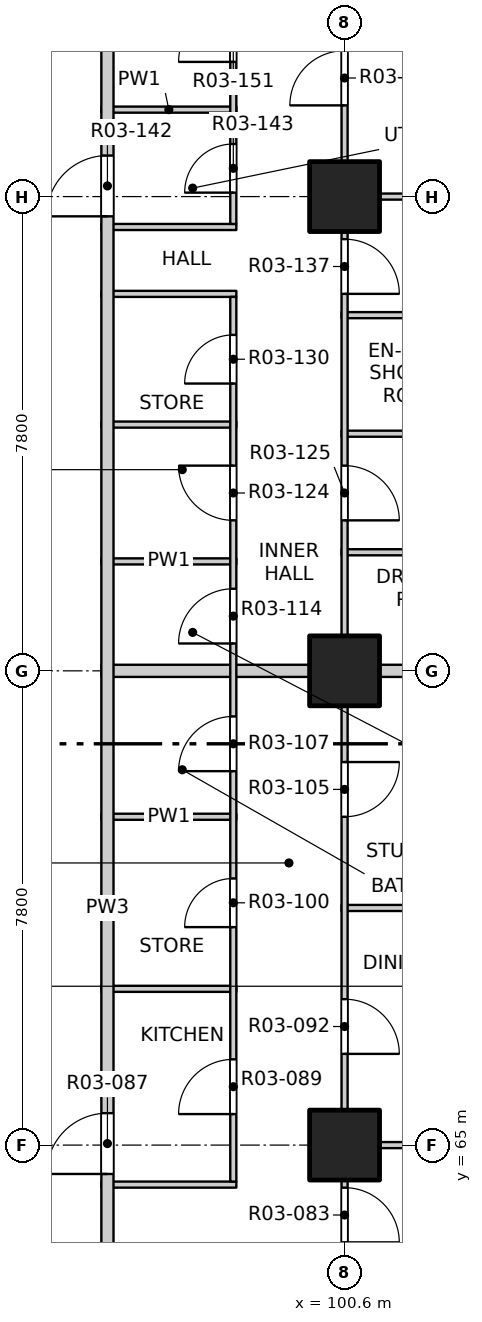
"""IFC4 building model, lengths in metres.
Left out: names, types, materials, properties, quantities, classifications, styles, units other than length and angle.
Written with IfcOpenShell. Run it as: python <this file> out.ifc"""

import sys

from ifc_helpers import new_model, si_unit, direction, frame, frame_2d, origin, origin_2d, place, context, subcontext, project, spatial, rectangle, extrude, element, fill, save


model = new_model("IFC4")
c1 = context("Model", 3, precision=1e-05, world=origin(), true_north=direction((0.0, 1.0)))
c2 = subcontext(c1, "Body", "Model", "MODEL_VIEW")
j1 = project(units=[si_unit("LENGTHUNIT", "METRE"), si_unit("PLANEANGLEUNIT", "RADIAN")], contexts=[c1])
p1 = place(None, origin())
s1 = spatial("IfcSite", under=j1, at=p1, CompositionType="ELEMENT")
p2 = place(p1, origin())
s2 = spatial("IfcBuilding", under=s1, at=p2, CompositionType="ELEMENT")
p3 = place(p2, frame((0.0, 0.0, 43.3)))
s3 = spatial("IfcBuildingStorey", under=s2, at=p3, CompositionType="ELEMENT", Elevation=43.3)
for number, where, z_axis, x_axis in (
    (1, (100.6, 65.0, -0.25), (0.0, 0.0, 1.0), (1.0, 0.0, 0.0)),
    (2, (100.6, 72.8, -0.25), (0.0, 0.0, 1.0), (1.0, 0.0, 0.0)),
    (3, (100.6, 80.6, -0.25), (0.0, 0.0, 1.0), (1.0, 0.0, 0.0)),
):
    element("IfcColumn", number, at=place(p3, frame(where, z_axis=z_axis, x_axis=x_axis)), inside=s3, PredefinedType="COLUMN", context=c2, shape_type="SweptSolid", body=[
        extrude(rectangle(XDim=1.15, YDim=1.15, at=origin_2d()), origin(), (0.0, 0.0, 1.0), 3.35),
    ])
p4 = place(p3, frame((96.6, 64.35, 0.0), z_axis=(0.0, 0.0, 1.0), x_axis=(1.0, 0.0, 0.0)))
e4 = element("IfcWall", 4, at=p4, inside=s3, PredefinedType="PARTITIONING", context=c2, shape_type="SweptSolid", body=[
    extrude(rectangle(XDim=2.22, YDim=0.1, at=frame_2d((1.11, 0.0))), origin(), (0.0, 0.0, 1.0), 3.1),
])
p5 = place(p3, frame((100.55, 65.0, 0.0), z_axis=(0.0, 0.0, 1.0), x_axis=(1.0, 0.0, 0.0)))
e5 = element("IfcWall", 5, at=p5, inside=s3, PredefinedType="PARTITIONING", context=c2, shape_type="SweptSolid", body=[
    extrude(rectangle(XDim=7.55, YDim=0.1, at=frame_2d((3.775, 0.0))), origin(), (0.0, 0.0, 1.0), 3.1),
])
p6 = place(p3, frame((96.6, 67.57, 0.0), z_axis=(0.0, 0.0, 1.0), x_axis=(1.0, 0.0, 0.0)))
e6 = element("IfcWall", 6, at=p6, inside=s3, PredefinedType="PARTITIONING", context=c2, shape_type="SweptSolid", body=[
    extrude(rectangle(XDim=2.22, YDim=0.1, at=frame_2d((1.11, 0.0))), origin(), (0.0, 0.0, 1.0), 3.1),
])
p7 = place(p3, frame((100.55, 68.9, 0.0), z_axis=(0.0, 0.0, 1.0), x_axis=(1.0, 0.0, 0.0)))
e7 = element("IfcWall", 7, at=p7, inside=s3, PredefinedType="PARTITIONING", context=c2, shape_type="SweptSolid", body=[
    extrude(rectangle(XDim=7.55, YDim=0.1, at=frame_2d((3.775, 0.0))), origin(), (0.0, 0.0, 1.0), 3.1),
])
p8 = place(p3, frame((96.6, 70.4, 0.0), z_axis=(0.0, 0.0, 1.0), x_axis=(1.0, 0.0, 0.0)))
e8 = element("IfcWall", 8, at=p8, inside=s3, PredefinedType="PARTITIONING", context=c2, shape_type="SweptSolid", body=[
    extrude(rectangle(XDim=2.22, YDim=0.1, at=frame_2d((1.11, 0.0))), origin(), (0.0, 0.0, 1.0), 3.1),
])
p9 = place(p3, frame((96.6, 72.8, 0.0), z_axis=(0.0, 0.0, 1.0), x_axis=(1.0, 0.0, 0.0)))
e9 = element("IfcWall", 9, at=p9, inside=s3, PredefinedType="PARTITIONING", context=c2, shape_type="SweptSolid", body=[
    extrude(rectangle(XDim=11.5, YDim=0.2, at=frame_2d((5.75, 0.0))), origin(), (0.0, 0.0, 1.0), 3.1),
])
p10 = place(p3, frame((96.6, 74.6, 0.0), z_axis=(0.0, 0.0, 1.0), x_axis=(1.0, 0.0, 0.0)))
e10 = element("IfcWall", 10, at=p10, inside=s3, PredefinedType="PARTITIONING", context=c2, shape_type="SweptSolid", body=[
    extrude(rectangle(XDim=2.22, YDim=0.1, at=frame_2d((1.11, 0.0))), origin(), (0.0, 0.0, 1.0), 3.1),
])
p11 = place(p3, frame((100.55, 74.75, 0.0), z_axis=(0.0, 0.0, 1.0), x_axis=(1.0, 0.0, 0.0)))
e11 = element("IfcWall", 11, at=p11, inside=s3, PredefinedType="PARTITIONING", context=c2, shape_type="SweptSolid", body=[
    extrude(rectangle(XDim=3.55, YDim=0.1, at=frame_2d((1.775, 0.0))), origin(), (0.0, 0.0, 1.0), 3.1),
])
p12 = place(p3, frame((100.55, 76.7, 0.0), z_axis=(0.0, 0.0, 1.0), x_axis=(1.0, 0.0, 0.0)))
e12 = element("IfcWall", 12, at=p12, inside=s3, PredefinedType="PARTITIONING", context=c2, shape_type="SweptSolid", body=[
    extrude(rectangle(XDim=7.55, YDim=0.1, at=frame_2d((3.775, 0.0))), origin(), (0.0, 0.0, 1.0), 3.1),
])
p13 = place(p3, frame((96.6, 76.85, 0.0), z_axis=(0.0, 0.0, 1.0), x_axis=(1.0, 0.0, 0.0)))
e13 = element("IfcWall", 13, at=p13, inside=s3, PredefinedType="PARTITIONING", context=c2, shape_type="SweptSolid", body=[
    extrude(rectangle(XDim=2.22, YDim=0.1, at=frame_2d((1.11, 0.0))), origin(), (0.0, 0.0, 1.0), 3.1),
])
p14 = place(p3, frame((100.55, 78.65, 0.0), z_axis=(0.0, 0.0, 1.0), x_axis=(1.0, 0.0, 0.0)))
e14 = element("IfcWall", 14, at=p14, inside=s3, PredefinedType="PARTITIONING", context=c2, shape_type="SweptSolid", body=[
    extrude(rectangle(XDim=3.55, YDim=0.1, at=frame_2d((1.775, 0.0))), origin(), (0.0, 0.0, 1.0), 3.1),
])
for number, where, z_axis, x_axis in (
    (15, (96.6, 79.0, 0.0), (0.0, 0.0, 1.0), (1.0, 0.0, 0.0)),
    (16, (96.6, 80.1, 0.0), (0.0, 0.0, 1.0), (1.0, 0.0, 0.0)),
):
    element("IfcWall", number, at=place(p3, frame(where, z_axis=z_axis, x_axis=x_axis)), inside=s3, PredefinedType="PARTITIONING", context=c2, shape_type="SweptSolid", body=[
        extrude(rectangle(XDim=2.22, YDim=0.1, at=frame_2d((1.11, 0.0))), origin(), (0.0, 0.0, 1.0), 3.1),
    ])
p15 = place(p3, frame((100.55, 80.6, 0.0), z_axis=(0.0, 0.0, 1.0), x_axis=(1.0, 0.0, 0.0)))
e17 = element("IfcWall", 17, at=p15, inside=s3, PredefinedType="PARTITIONING", context=c2, shape_type="SweptSolid", body=[
    extrude(rectangle(XDim=7.55, YDim=0.1, at=frame_2d((3.775, 0.0))), origin(), (0.0, 0.0, 1.0), 3.1),
])
p16 = place(p3, frame((96.6, 82.03, 0.0), z_axis=(0.0, 0.0, 1.0), x_axis=(1.0, 0.0, 0.0)))
e18 = element("IfcWall", 18, at=p16, inside=s3, PredefinedType="PARTITIONING", context=c2, shape_type="SweptSolid", body=[
    extrude(rectangle(XDim=2.22, YDim=0.1, at=frame_2d((1.11, 0.0))), origin(), (0.0, 0.0, 1.0), 3.1),
])
p17 = place(p3, frame((96.7, 53.4, 0.0), z_axis=(0.0, 0.0, 1.0), x_axis=(0.0, 1.0, 0.0)))
e19 = element("IfcWall", 19, at=p17, inside=s3, PredefinedType="PARTITIONING", context=c2, shape_type="SweptSolid", body=[
    extrude(rectangle(XDim=31.0, YDim=0.2, at=frame_2d((15.5, 0.0))), origin(), (0.0, 0.0, 1.0), 3.1),
])
p18 = place(p17, frame((3.325, 0.0, 0.0)))
e20 = element("IfcOpeningElement", 20, at=p18, cuts=e19, PredefinedType="OPENING", context=c2, shape_type="SweptSolid", body=[
    extrude(rectangle(XDim=1.0, YDim=2.1, at=frame_2d((0.5, 1.05))), frame((0.0, 0.11, 0.0), z_axis=(0.0, -1.0, 0.0), x_axis=(1.0, 0.0, 0.0)), (0.0, 0.0, 1.0), 0.22),
])
p19 = place(p17, frame((11.125, 0.0, 0.0)))
e21 = element("IfcOpeningElement", 21, at=p19, cuts=e19, PredefinedType="OPENING", context=c2, shape_type="SweptSolid", body=[
    extrude(rectangle(XDim=1.0, YDim=2.1, at=frame_2d((0.5, 1.05))), frame((0.0, 0.11, 0.0), z_axis=(0.0, -1.0, 0.0), x_axis=(1.0, 0.0, 0.0)), (0.0, 0.0, 1.0), 0.22),
])
p20 = place(p17, frame((26.875, 0.0, 0.0)))
e22 = element("IfcOpeningElement", 22, at=p20, cuts=e19, PredefinedType="OPENING", context=c2, shape_type="SweptSolid", body=[
    extrude(rectangle(XDim=1.0, YDim=2.1, at=frame_2d((0.5, 1.05))), frame((0.0, 0.11, 0.0), z_axis=(0.0, -1.0, 0.0), x_axis=(1.0, 0.0, 0.0)), (0.0, 0.0, 1.0), 0.22),
])
p21 = place(p3, frame((98.77, 64.4, 0.0), z_axis=(0.0, 0.0, 1.0), x_axis=(0.0, 1.0, 0.0)))
e23 = element("IfcWall", 23, at=p21, inside=s3, PredefinedType="PARTITIONING", context=c2, shape_type="SweptSolid", body=[
    extrude(rectangle(XDim=14.55, YDim=0.1, at=frame_2d((7.275, 0.0))), origin(), (0.0, 0.0, 1.0), 3.1),
])
p22 = place(p21, frame((1.11, 0.0, 0.0)))
e24 = element("IfcOpeningElement", 24, at=p22, cuts=e23, PredefinedType="OPENING", context=c2, shape_type="SweptSolid", body=[
    extrude(rectangle(XDim=0.9, YDim=2.1, at=frame_2d((0.45, 1.05))), frame((0.0, 0.06, 0.0), z_axis=(0.0, -1.0, 0.0), x_axis=(1.0, 0.0, 0.0)), (0.0, 0.0, 1.0), 0.12),
])
p23 = place(p21, frame((4.185, 0.0, 0.0)))
e25 = element("IfcOpeningElement", 25, at=p23, cuts=e23, PredefinedType="OPENING", context=c2, shape_type="SweptSolid", body=[
    extrude(rectangle(XDim=0.8, YDim=2.1, at=frame_2d((0.4, 1.05))), frame((0.0, 0.06, 0.0), z_axis=(0.0, -1.0, 0.0), x_axis=(1.0, 0.0, 0.0)), (0.0, 0.0, 1.0), 0.12),
])
p24 = place(p21, frame((6.75, 0.0, 0.0)))
e26 = element("IfcOpeningElement", 26, at=p24, cuts=e23, PredefinedType="OPENING", context=c2, shape_type="SweptSolid", body=[
    extrude(rectangle(XDim=0.9, YDim=2.1, at=frame_2d((0.45, 1.05))), frame((0.0, 0.06, 0.0), z_axis=(0.0, -1.0, 0.0), x_axis=(1.0, 0.0, 0.0)), (0.0, 0.0, 1.0), 0.12),
])
p25 = place(p21, frame((8.85, 0.0, 0.0)))
e27 = element("IfcOpeningElement", 27, at=p25, cuts=e23, PredefinedType="OPENING", context=c2, shape_type="SweptSolid", body=[
    extrude(rectangle(XDim=0.9, YDim=2.1, at=frame_2d((0.45, 1.05))), frame((0.0, 0.06, 0.0), z_axis=(0.0, -1.0, 0.0), x_axis=(1.0, 0.0, 0.0)), (0.0, 0.0, 1.0), 0.12),
])
p26 = place(p21, frame((10.875, 0.0, 0.0)))
e28 = element("IfcOpeningElement", 28, at=p26, cuts=e23, PredefinedType="OPENING", context=c2, shape_type="SweptSolid", body=[
    extrude(rectangle(XDim=0.9, YDim=2.1, at=frame_2d((0.45, 1.05))), frame((0.0, 0.06, 0.0), z_axis=(0.0, -1.0, 0.0), x_axis=(1.0, 0.0, 0.0)), (0.0, 0.0, 1.0), 0.12),
])
p27 = place(p21, frame((13.125, 0.0, 0.0)))
e29 = element("IfcOpeningElement", 29, at=p27, cuts=e23, PredefinedType="OPENING", context=c2, shape_type="SweptSolid", body=[
    extrude(rectangle(XDim=0.8, YDim=2.1, at=frame_2d((0.4, 1.05))), frame((0.0, 0.06, 0.0), z_axis=(0.0, -1.0, 0.0), x_axis=(1.0, 0.0, 0.0)), (0.0, 0.0, 1.0), 0.12),
])
p28 = place(p3, frame((98.77, 80.15, 0.0), z_axis=(0.0, 0.0, 1.0), x_axis=(0.0, 1.0, 0.0)))
e30 = element("IfcWall", 30, at=p28, inside=s3, PredefinedType="PARTITIONING", context=c2, shape_type="SweptSolid", body=[
    extrude(rectangle(XDim=4.3, YDim=0.1, at=frame_2d((2.15, 0.0))), origin(), (0.0, 0.0, 1.0), 3.1),
])
p29 = place(p28, frame((0.515, 0.0, 0.0)))
e31 = element("IfcOpeningElement", 31, at=p29, cuts=e30, PredefinedType="OPENING", context=c2, shape_type="SweptSolid", body=[
    extrude(rectangle(XDim=0.8, YDim=2.1, at=frame_2d((0.4, 1.05))), frame((0.0, 0.06, 0.0), z_axis=(0.0, -1.0, 0.0), x_axis=(1.0, 0.0, 0.0)), (0.0, 0.0, 1.0), 0.12),
])
p30 = place(p28, frame((2.665, 0.0, 0.0)))
e32 = element("IfcOpeningElement", 32, at=p30, cuts=e30, PredefinedType="OPENING", context=c2, shape_type="SweptSolid", body=[
    extrude(rectangle(XDim=0.9, YDim=2.1, at=frame_2d((0.45, 1.05))), frame((0.0, 0.06, 0.0), z_axis=(0.0, -1.0, 0.0), x_axis=(1.0, 0.0, 0.0)), (0.0, 0.0, 1.0), 0.12),
])
p31 = place(p3, frame((100.6, 41.9, 0.0), z_axis=(0.0, 0.0, 1.0), x_axis=(0.0, 1.0, 0.0)))
e33 = element("IfcWall", 33, at=p31, inside=s3, PredefinedType="PARTITIONING", context=c2, shape_type="SweptSolid", body=[
    extrude(rectangle(XDim=46.2, YDim=0.1, at=frame_2d((23.1, 0.0))), origin(), (0.0, 0.0, 1.0), 3.1),
])
p32 = place(p31, frame((1.2, 0.0, 0.0)))
e34 = element("IfcOpeningElement", 34, at=p32, cuts=e33, PredefinedType="OPENING", context=c2, shape_type="SweptSolid", body=[
    extrude(rectangle(XDim=0.9, YDim=2.1, at=frame_2d((0.45, 1.05))), frame((0.0, 0.06, 0.0), z_axis=(0.0, -1.0, 0.0), x_axis=(1.0, 0.0, 0.0)), (0.0, 0.0, 1.0), 0.12),
])
p33 = place(p31, frame((5.9, 0.0, 0.0)))
e35 = element("IfcOpeningElement", 35, at=p33, cuts=e33, PredefinedType="OPENING", context=c2, shape_type="SweptSolid", body=[
    extrude(rectangle(XDim=0.9, YDim=2.1, at=frame_2d((0.45, 1.05))), frame((0.0, 0.06, 0.0), z_axis=(0.0, -1.0, 0.0), x_axis=(1.0, 0.0, 0.0)), (0.0, 0.0, 1.0), 0.12),
])
p34 = place(p31, frame((9.0, 0.0, 0.0)))
e36 = element("IfcOpeningElement", 36, at=p34, cuts=e33, PredefinedType="OPENING", context=c2, shape_type="SweptSolid", body=[
    extrude(rectangle(XDim=0.9, YDim=2.1, at=frame_2d((0.45, 1.05))), frame((0.0, 0.06, 0.0), z_axis=(0.0, -1.0, 0.0), x_axis=(1.0, 0.0, 0.0)), (0.0, 0.0, 1.0), 0.12),
])
p35 = place(p31, frame((13.725, 0.0, 0.0)))
e37 = element("IfcOpeningElement", 37, at=p35, cuts=e33, PredefinedType="OPENING", context=c2, shape_type="SweptSolid", body=[
    extrude(rectangle(XDim=0.9, YDim=2.1, at=frame_2d((0.45, 1.05))), frame((0.0, 0.06, 0.0), z_axis=(0.0, -1.0, 0.0), x_axis=(1.0, 0.0, 0.0)), (0.0, 0.0, 1.0), 0.12),
])
p36 = place(p31, frame((17.775, 0.0, 0.0)))
e38 = element("IfcOpeningElement", 38, at=p36, cuts=e33, PredefinedType="OPENING", context=c2, shape_type="SweptSolid", body=[
    extrude(rectangle(XDim=0.9, YDim=2.1, at=frame_2d((0.45, 1.05))), frame((0.0, 0.06, 0.0), z_axis=(0.0, -1.0, 0.0), x_axis=(1.0, 0.0, 0.0)), (0.0, 0.0, 1.0), 0.12),
])
p37 = place(p31, frame((21.5, 0.0, 0.0)))
e39 = element("IfcOpeningElement", 39, at=p37, cuts=e33, PredefinedType="OPENING", context=c2, shape_type="SweptSolid", body=[
    extrude(rectangle(XDim=0.9, YDim=2.1, at=frame_2d((0.45, 1.05))), frame((0.0, 0.06, 0.0), z_axis=(0.0, -1.0, 0.0), x_axis=(1.0, 0.0, 0.0)), (0.0, 0.0, 1.0), 0.12),
])
p38 = place(p31, frame((24.6, 0.0, 0.0)))
e40 = element("IfcOpeningElement", 40, at=p38, cuts=e33, PredefinedType="OPENING", context=c2, shape_type="SweptSolid", body=[
    extrude(rectangle(XDim=0.9, YDim=2.1, at=frame_2d((0.45, 1.05))), frame((0.0, 0.06, 0.0), z_axis=(0.0, -1.0, 0.0), x_axis=(1.0, 0.0, 0.0)), (0.0, 0.0, 1.0), 0.12),
])
p39 = place(p31, frame((28.5, 0.0, 0.0)))
e41 = element("IfcOpeningElement", 41, at=p39, cuts=e33, PredefinedType="OPENING", context=c2, shape_type="SweptSolid", body=[
    extrude(rectangle(XDim=0.9, YDim=2.1, at=frame_2d((0.45, 1.05))), frame((0.0, 0.06, 0.0), z_axis=(0.0, -1.0, 0.0), x_axis=(1.0, 0.0, 0.0)), (0.0, 0.0, 1.0), 0.12),
])
p40 = place(p31, frame((33.375, 0.0, 0.0)))
e42 = element("IfcOpeningElement", 42, at=p40, cuts=e33, PredefinedType="OPENING", context=c2, shape_type="SweptSolid", body=[
    extrude(rectangle(XDim=0.9, YDim=2.1, at=frame_2d((0.45, 1.05))), frame((0.0, 0.06, 0.0), z_axis=(0.0, -1.0, 0.0), x_axis=(1.0, 0.0, 0.0)), (0.0, 0.0, 1.0), 0.12),
])
p41 = place(p31, frame((37.1, 0.0, 0.0)))
e43 = element("IfcOpeningElement", 43, at=p41, cuts=e33, PredefinedType="OPENING", context=c2, shape_type="SweptSolid", body=[
    extrude(rectangle(XDim=0.9, YDim=2.1, at=frame_2d((0.45, 1.05))), frame((0.0, 0.06, 0.0), z_axis=(0.0, -1.0, 0.0), x_axis=(1.0, 0.0, 0.0)), (0.0, 0.0, 1.0), 0.12),
])
p42 = place(p31, frame((40.2, 0.0, 0.0)))
e44 = element("IfcOpeningElement", 44, at=p42, cuts=e33, PredefinedType="OPENING", context=c2, shape_type="SweptSolid", body=[
    extrude(rectangle(XDim=0.9, YDim=2.1, at=frame_2d((0.45, 1.05))), frame((0.0, 0.06, 0.0), z_axis=(0.0, -1.0, 0.0), x_axis=(1.0, 0.0, 0.0)), (0.0, 0.0, 1.0), 0.12),
])
p43 = place(p31, frame((44.1, 0.0, 0.0)))
e45 = element("IfcOpeningElement", 45, at=p43, cuts=e33, PredefinedType="OPENING", context=c2, shape_type="SweptSolid", body=[
    extrude(rectangle(XDim=0.9, YDim=2.1, at=frame_2d((0.45, 1.05))), frame((0.0, 0.06, 0.0), z_axis=(0.0, -1.0, 0.0), x_axis=(1.0, 0.0, 0.0)), (0.0, 0.0, 1.0), 0.12),
])
p44 = place(p37, origin())
e46 = element("IfcDoor", 46, at=p44, inside=s3, OperationType="SINGLE_SWING_RIGHT", PredefinedType="DOOR", context=c2, shape_type="SweptSolid", body=[
    extrude(rectangle(XDim=0.9, YDim=2.1, at=frame_2d((0.45, 1.05))), frame((0.0, 0.025, 0.0), z_axis=(0.0, -1.0, 0.0), x_axis=(1.0, 0.0, 0.0)), (0.0, 0.0, 1.0), 0.05),
])
fill(e39, e46)
p45 = place(p19, origin())
e47 = element("IfcDoor", 47, at=p45, inside=s3, OperationType="SINGLE_SWING_LEFT", PredefinedType="DOOR", context=c2, shape_type="SweptSolid", body=[
    extrude(rectangle(XDim=1.0, YDim=2.1, at=frame_2d((0.5, 1.05))), frame((0.0, 0.025, 0.0), z_axis=(0.0, -1.0, 0.0), x_axis=(1.0, 0.0, 0.0)), (0.0, 0.0, 1.0), 0.05),
])
fill(e21, e47)
p46 = place(p22, origin())
e48 = element("IfcDoor", 48, at=p46, inside=s3, OperationType="SINGLE_SWING_LEFT", PredefinedType="DOOR", context=c2, shape_type="SweptSolid", body=[
    extrude(rectangle(XDim=0.9, YDim=2.1, at=frame_2d((0.45, 1.05))), frame((0.0, 0.025, 0.0), z_axis=(0.0, -1.0, 0.0), x_axis=(1.0, 0.0, 0.0)), (0.0, 0.0, 1.0), 0.05),
])
fill(e24, e48)
p47 = place(p38, origin())
e49 = element("IfcDoor", 49, at=p47, inside=s3, OperationType="SINGLE_SWING_RIGHT", PredefinedType="DOOR", context=c2, shape_type="SweptSolid", body=[
    extrude(rectangle(XDim=0.9, YDim=2.1, at=frame_2d((0.45, 1.05))), frame((0.0, 0.025, 0.0), z_axis=(0.0, -1.0, 0.0), x_axis=(1.0, 0.0, 0.0)), (0.0, 0.0, 1.0), 0.05),
])
fill(e40, e49)
p48 = place(p23, origin())
e50 = element("IfcDoor", 50, at=p48, inside=s3, OperationType="SINGLE_SWING_LEFT", PredefinedType="DOOR", context=c2, shape_type="SweptSolid", body=[
    extrude(rectangle(XDim=0.8, YDim=2.1, at=frame_2d((0.4, 1.05))), frame((0.0, 0.025, 0.0), z_axis=(0.0, -1.0, 0.0), x_axis=(1.0, 0.0, 0.0)), (0.0, 0.0, 1.0), 0.05),
])
fill(e25, e50)
p49 = place(p39, origin())
e51 = element("IfcDoor", 51, at=p49, inside=s3, OperationType="SINGLE_SWING_LEFT", PredefinedType="DOOR", context=c2, shape_type="SweptSolid", body=[
    extrude(rectangle(XDim=0.9, YDim=2.1, at=frame_2d((0.45, 1.05))), frame((0.0, 0.025, 0.0), z_axis=(0.0, -1.0, 0.0), x_axis=(1.0, 0.0, 0.0)), (0.0, 0.0, 1.0), 0.05),
])
fill(e41, e51)
p50 = place(p24, origin())
e52 = element("IfcDoor", 52, at=p50, inside=s3, OperationType="SINGLE_SWING_LEFT", PredefinedType="DOOR", context=c2, shape_type="SweptSolid", body=[
    extrude(rectangle(XDim=0.9, YDim=2.1, at=frame_2d((0.45, 1.05))), frame((0.0, 0.025, 0.0), z_axis=(0.0, -1.0, 0.0), x_axis=(1.0, 0.0, 0.0)), (0.0, 0.0, 1.0), 0.05),
])
fill(e26, e52)
p51 = place(p25, origin())
e53 = element("IfcDoor", 53, at=p51, inside=s3, OperationType="SINGLE_SWING_LEFT", PredefinedType="DOOR", context=c2, shape_type="SweptSolid", body=[
    extrude(rectangle(XDim=0.9, YDim=2.1, at=frame_2d((0.45, 1.05))), frame((0.0, 0.025, 0.0), z_axis=(0.0, -1.0, 0.0), x_axis=(1.0, 0.0, 0.0)), (0.0, 0.0, 1.0), 0.05),
])
fill(e27, e53)
p52 = place(p26, origin())
e54 = element("IfcDoor", 54, at=p52, inside=s3, OperationType="SINGLE_SWING_RIGHT", PredefinedType="DOOR", context=c2, shape_type="SweptSolid", body=[
    extrude(rectangle(XDim=0.9, YDim=2.1, at=frame_2d((0.45, 1.05))), frame((0.0, 0.025, 0.0), z_axis=(0.0, -1.0, 0.0), x_axis=(1.0, 0.0, 0.0)), (0.0, 0.0, 1.0), 0.05),
])
fill(e28, e54)
p53 = place(p40, origin())
e55 = element("IfcDoor", 55, at=p53, inside=s3, OperationType="SINGLE_SWING_RIGHT", PredefinedType="DOOR", context=c2, shape_type="SweptSolid", body=[
    extrude(rectangle(XDim=0.9, YDim=2.1, at=frame_2d((0.45, 1.05))), frame((0.0, 0.025, 0.0), z_axis=(0.0, -1.0, 0.0), x_axis=(1.0, 0.0, 0.0)), (0.0, 0.0, 1.0), 0.05),
])
fill(e42, e55)
p54 = place(p27, origin())
e56 = element("IfcDoor", 56, at=p54, inside=s3, OperationType="SINGLE_SWING_LEFT", PredefinedType="DOOR", context=c2, shape_type="SweptSolid", body=[
    extrude(rectangle(XDim=0.8, YDim=2.1, at=frame_2d((0.4, 1.05))), frame((0.0, 0.025, 0.0), z_axis=(0.0, -1.0, 0.0), x_axis=(1.0, 0.0, 0.0)), (0.0, 0.0, 1.0), 0.05),
])
fill(e29, e56)
p55 = place(p41, origin())
e57 = element("IfcDoor", 57, at=p55, inside=s3, OperationType="SINGLE_SWING_RIGHT", PredefinedType="DOOR", context=c2, shape_type="SweptSolid", body=[
    extrude(rectangle(XDim=0.9, YDim=2.1, at=frame_2d((0.45, 1.05))), frame((0.0, 0.025, 0.0), z_axis=(0.0, -1.0, 0.0), x_axis=(1.0, 0.0, 0.0)), (0.0, 0.0, 1.0), 0.05),
])
fill(e43, e57)
p56 = place(p20, origin())
e58 = element("IfcDoor", 58, at=p56, inside=s3, OperationType="SINGLE_SWING_LEFT", PredefinedType="DOOR", context=c2, shape_type="SweptSolid", body=[
    extrude(rectangle(XDim=1.0, YDim=2.1, at=frame_2d((0.5, 1.05))), frame((0.0, 0.025, 0.0), z_axis=(0.0, -1.0, 0.0), x_axis=(1.0, 0.0, 0.0)), (0.0, 0.0, 1.0), 0.05),
])
fill(e22, e58)
p57 = place(p29, origin())
e59 = element("IfcDoor", 59, at=p57, inside=s3, OperationType="SINGLE_SWING_LEFT", PredefinedType="DOOR", context=c2, shape_type="SweptSolid", body=[
    extrude(rectangle(XDim=0.8, YDim=2.1, at=frame_2d((0.4, 1.05))), frame((0.0, 0.025, 0.0), z_axis=(0.0, -1.0, 0.0), x_axis=(1.0, 0.0, 0.0)), (0.0, 0.0, 1.0), 0.05),
])
fill(e31, e59)
p58 = place(p42, origin())
e60 = element("IfcDoor", 60, at=p58, inside=s3, OperationType="SINGLE_SWING_LEFT", PredefinedType="DOOR", context=c2, shape_type="SweptSolid", body=[
    extrude(rectangle(XDim=0.9, YDim=2.1, at=frame_2d((0.45, 1.05))), frame((0.0, 0.025, 0.0), z_axis=(0.0, -1.0, 0.0), x_axis=(1.0, 0.0, 0.0)), (0.0, 0.0, 1.0), 0.05),
])
fill(e44, e60)
p59 = place(p30, origin())
e61 = element("IfcDoor", 61, at=p59, inside=s3, OperationType="SINGLE_SWING_LEFT", PredefinedType="DOOR", context=c2, shape_type="SweptSolid", body=[
    extrude(rectangle(XDim=0.9, YDim=2.1, at=frame_2d((0.45, 1.05))), frame((0.0, 0.025, 0.0), z_axis=(0.0, -1.0, 0.0), x_axis=(1.0, 0.0, 0.0)), (0.0, 0.0, 1.0), 0.05),
])
fill(e32, e61)
save(model, sys.argv[1])
